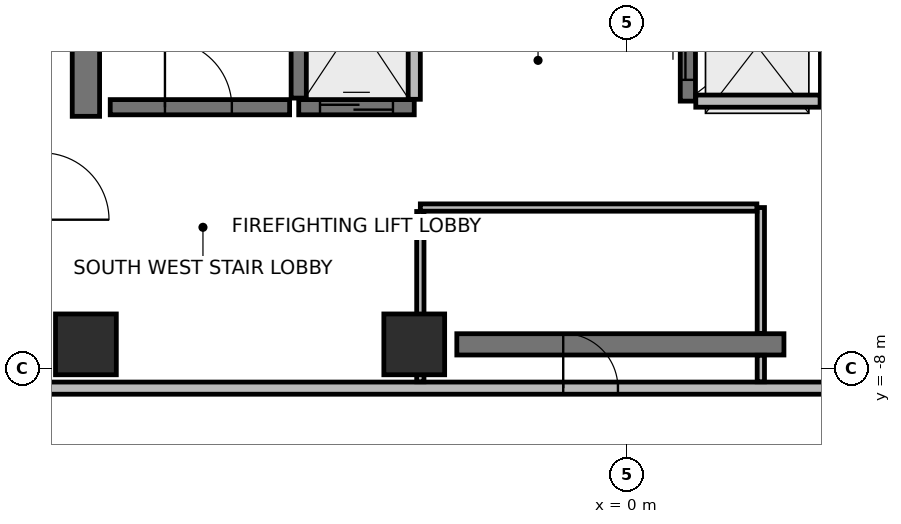
"""IFC4 building model, lengths in metres.
Left out: names, types, materials, properties, quantities, classifications, styles, units other than length and angle.
Written with IfcOpenShell. Run it as: python <this file> out.ifc"""

import sys

from ifc_helpers import new_model, si_unit, direction, frame, frame_2d, origin, origin_2d, place, context, subcontext, project, spatial, rectangle, extrude, element, fill, save


model = new_model("IFC4")
c1 = context("Model", 3, precision=1e-05, world=origin(), true_north=direction((0.0, 1.0)))
c2 = subcontext(c1, "Body", "Model", "MODEL_VIEW")
j1 = project(units=[si_unit("LENGTHUNIT", "METRE"), si_unit("PLANEANGLEUNIT", "RADIAN")], contexts=[c1])
p1 = place(None, origin())
s1 = spatial("IfcSite", under=j1, at=p1, CompositionType="ELEMENT")
p2 = place(p1, origin())
s2 = spatial("IfcBuilding", under=s1, at=p2, CompositionType="ELEMENT")
p3 = place(p2, frame((0.0, 0.0, 306.3)))
s3 = spatial("IfcBuildingStorey", under=s2, at=p3, CompositionType="ELEMENT", Elevation=306.3)
for number, where, z_axis, x_axis in (
    (1, (-8.9, -7.6, 0.0), (0.0, 0.0, 1.0), (1.0, 0.0, 0.0)),
    (2, (-3.5, -7.6, 0.0), (0.0, 0.0, 1.0), (1.0, 0.0, 0.0)),
):
    element("IfcColumn", number, at=place(p3, frame(where, z_axis=z_axis, x_axis=x_axis)), inside=s3, PredefinedType="COLUMN", context=c2, shape_type="SweptSolid", body=[
        extrude(rectangle(XDim=1.0, YDim=1.0, at=origin_2d()), origin(), (0.0, 0.0, 1.0), 4.55),
    ])
p4 = place(p3, frame((-24.537, -0.339, 0.0), z_axis=(0.0, 0.0, 1.0), x_axis=(0.669127961041, -0.743147207324, 0.0)))
e3 = element("IfcWall", 3, at=p4, inside=s3, PredefinedType="STANDARD", context=c2, shape_type="SweptSolid", body=[
    extrude(rectangle(XDim=42.14, YDim=0.3, at=frame_2d((21.07, 0.0))), origin(), (0.0, 0.0, 1.0), 3.805),
])
p5 = place(p4, frame((20.27, 0.0, 0.0)))
e4 = element("IfcOpeningElement", 4, at=p5, cuts=e3, PredefinedType="OPENING", context=c2, shape_type="SweptSolid", body=[
    extrude(rectangle(XDim=1.6, YDim=2.3, at=frame_2d((0.8, 1.15))), frame((0.0, 0.16, 0.0), z_axis=(0.0, -1.0, 0.0), x_axis=(1.0, 0.0, 0.0)), (0.0, 0.0, 1.0), 0.32),
])
p6 = place(p4, frame((9.535, 0.0, 0.85)))
e5 = element("IfcOpeningElement", 5, at=p6, cuts=e3, PredefinedType="OPENING", context=c2, shape_type="SweptSolid", body=[
    extrude(rectangle(XDim=2.0, YDim=2.4, at=frame_2d((1.0, 1.2))), frame((0.0, 0.16, 0.0), z_axis=(0.0, -1.0, 0.0), x_axis=(1.0, 0.0, 0.0)), (0.0, 0.0, 1.0), 0.32),
])
p7 = place(p4, frame((30.605, 0.0, 0.85)))
e6 = element("IfcOpeningElement", 6, at=p7, cuts=e3, PredefinedType="OPENING", context=c2, shape_type="SweptSolid", body=[
    extrude(rectangle(XDim=2.0, YDim=2.4, at=frame_2d((1.0, 1.2))), frame((0.0, 0.16, 0.0), z_axis=(0.0, -1.0, 0.0), x_axis=(1.0, 0.0, 0.0)), (0.0, 0.0, 1.0), 0.32),
])
p8 = place(p3, frame((-2.8, -7.6, 0.0), z_axis=(0.0, 0.0, 1.0), x_axis=(1.0, 0.0, 0.0)))
e7 = element("IfcWall", 7, at=p8, inside=s3, PredefinedType="SHEAR", context=c2, shape_type="SweptSolid", body=[
    extrude(rectangle(XDim=5.38, YDim=0.35, at=frame_2d((2.69, 0.0))), origin(), (0.0, 0.0, 1.0), 4.31),
])
p9 = place(p3, frame((-8.9, -3.85, 0.0), z_axis=(0.0, 0.0, 1.0), x_axis=(0.0, 1.0, 0.0)))
e8 = element("IfcWall", 8, at=p9, inside=s3, PredefinedType="SHEAR", context=c2, shape_type="SweptSolid", body=[
    extrude(rectangle(XDim=10.7, YDim=0.45, at=frame_2d((5.35, 0.0))), origin(), (0.0, 0.0, 1.0), 4.31),
])
p10 = place(p3, frame((-9.62, -8.32, 0.0), z_axis=(0.0, 0.0, 1.0), x_axis=(1.0, 0.0, 0.0)))
e9 = element("IfcWall", 9, at=p10, inside=s3, PredefinedType="PARTITIONING", context=c2, shape_type="SweptSolid", body=[
    extrude(rectangle(XDim=19.24, YDim=0.2, at=frame_2d((9.62, 0.0))), origin(), (0.0, 0.0, 1.0), 3.805),
])
p11 = place(p10, frame((8.57, 0.0, 0.0)))
e10 = element("IfcOpeningElement", 10, at=p11, cuts=e9, PredefinedType="OPENING", context=c2, shape_type="SweptSolid", body=[
    extrude(rectangle(XDim=0.9, YDim=2.1, at=frame_2d((0.45, 1.05))), frame((0.0, 0.11, 0.0), z_axis=(0.0, -1.0, 0.0), x_axis=(1.0, 0.0, 0.0)), (0.0, 0.0, 1.0), 0.22),
])
p12 = place(p10, frame((15.02, 0.0, 0.0)))
e11 = element("IfcOpeningElement", 11, at=p12, cuts=e9, PredefinedType="OPENING", context=c2, shape_type="SweptSolid", body=[
    extrude(rectangle(XDim=0.9, YDim=2.1, at=frame_2d((0.45, 1.05))), frame((0.0, 0.11, 0.0), z_axis=(0.0, -1.0, 0.0), x_axis=(1.0, 0.0, 0.0)), (0.0, 0.0, 1.0), 0.22),
])
p13 = place(p3, frame((-5.4, -3.55, 0.0), z_axis=(0.0, 0.0, 1.0), x_axis=(0.0, 1.0, 0.0)))
e12 = element("IfcWall", 12, at=p13, inside=s3, PredefinedType="SHEAR", context=c2, shape_type="SweptSolid", body=[
    extrude(rectangle(XDim=7.3, YDim=0.25, at=frame_2d((3.65, 0.0))), origin(), (0.0, 0.0, 1.0), 4.31),
])
p14 = place(p3, frame((-8.5, -3.7, 0.0), z_axis=(0.0, 0.0, 1.0), x_axis=(1.0, 0.0, 0.0)))
e13 = element("IfcWall", 13, at=p14, inside=s3, PredefinedType="SHEAR", context=c2, shape_type="SweptSolid", body=[
    extrude(rectangle(XDim=2.95, YDim=0.25, at=frame_2d((1.475, 0.0))), origin(), (0.0, 0.0, 1.0), 4.31),
])
p15 = place(p14, frame((0.9, 0.0, 0.0)))
e14 = element("IfcOpeningElement", 14, at=p15, cuts=e13, PredefinedType="OPENING", context=c2, shape_type="SweptSolid", body=[
    extrude(rectangle(XDim=1.1, YDim=2.15, at=frame_2d((0.55, 1.075))), frame((0.0, 0.135, 0.0), z_axis=(0.0, -1.0, 0.0), x_axis=(1.0, 0.0, 0.0)), (0.0, 0.0, 1.0), 0.27),
])
p16 = place(p3, frame((1.0, -3.6, 0.0), z_axis=(0.0, 0.0, 1.0), x_axis=(0.0, 1.0, 0.0)))
e15 = element("IfcWall", 15, at=p16, inside=s3, PredefinedType="SHEAR", context=c2, shape_type="SweptSolid", body=[
    extrude(rectangle(XDim=1.8, YDim=0.25, at=frame_2d((0.9, 0.0))), origin(), (0.0, 0.0, 1.0), 4.31),
])
p17 = place(p16, frame((0.35, 0.0, 0.0)))
e16 = element("IfcOpeningElement", 16, at=p17, cuts=e15, PredefinedType="OPENING", context=c2, shape_type="SweptSolid", body=[
    extrude(rectangle(XDim=1.1, YDim=2.2, at=frame_2d((0.55, 1.1))), frame((0.0, 0.135, 0.0), z_axis=(0.0, -1.0, 0.0), x_axis=(1.0, 0.0, 0.0)), (0.0, 0.0, 1.0), 0.27),
])
p18 = place(p3, frame((3.28, -3.6, 0.0), z_axis=(0.0, 0.0, 1.0), x_axis=(0.0, 1.0, 0.0)))
e17 = element("IfcWall", 17, at=p18, inside=s3, PredefinedType="PARTITIONING", context=c2, shape_type="SweptSolid", body=[
    extrude(rectangle(XDim=1.8, YDim=0.2, at=frame_2d((0.9, 0.0))), origin(), (0.0, 0.0, 1.0), 4.31),
])
p19 = place(p3, frame((1.13, -3.6, 0.0), z_axis=(0.0, 0.0, 1.0), x_axis=(1.0, 0.0, 0.0)))
e18 = element("IfcWall", 18, at=p19, inside=s3, PredefinedType="PARTITIONING", context=c2, shape_type="SweptSolid", body=[
    extrude(rectangle(XDim=2.045, YDim=0.2, at=frame_2d((1.022, 0.0))), origin(), (0.0, 0.0, 1.0), 4.31),
])
p20 = place(p3, frame((-5.4, -3.7, 0.0), z_axis=(0.0, 0.0, 1.0), x_axis=(1.0, 0.0, 0.0)))
e19 = element("IfcWall", 19, at=p20, inside=s3, PredefinedType="SHEAR", context=c2, shape_type="SweptSolid", body=[
    extrude(rectangle(XDim=1.9, YDim=0.25, at=frame_2d((0.95, 0.0))), origin(), (0.0, 0.0, 1.0), 4.31),
])
p21 = place(p20, frame((0.35, 0.0, 0.0)))
e20 = element("IfcOpeningElement", 20, at=p21, cuts=e19, PredefinedType="OPENING", context=c2, shape_type="SweptSolid", body=[
    extrude(rectangle(XDim=1.2, YDim=2.2, at=frame_2d((0.6, 1.1))), frame((0.0, 0.135, 0.0), z_axis=(0.0, -1.0, 0.0), x_axis=(1.0, 0.0, 0.0)), (0.0, 0.0, 1.0), 0.27),
])
p22 = place(p3, frame((-3.5, -3.57, 0.0), z_axis=(0.0, 0.0, 1.0), x_axis=(0.0, 1.0, 0.0)))
e21 = element("IfcWall", 21, at=p22, inside=s3, PredefinedType="PARTITIONING", context=c2, shape_type="SweptSolid", body=[
    extrude(rectangle(XDim=2.615, YDim=0.2, at=frame_2d((1.308, 0.0))), origin(), (0.0, 0.0, 1.0), 4.31),
])
p23 = place(p3, frame((2.2, -8.215, 0.0), z_axis=(0.0, 0.0, 1.0), x_axis=(0.0, 1.0, 0.0)))
e22 = element("IfcWall", 22, at=p23, inside=s3, PredefinedType="PARTITIONING", context=c2, shape_type="SweptSolid", body=[
    extrude(rectangle(XDim=0.435, YDim=0.12, at=frame_2d((0.218, 0.0))), origin(), (0.0, 0.0, 1.0), 3.605),
])
p24 = place(p3, frame((2.2, -7.42, 0.0), z_axis=(0.0, 0.0, 1.0), x_axis=(0.0, 1.0, 0.0)))
e23 = element("IfcWall", 23, at=p24, inside=s3, PredefinedType="PARTITIONING", context=c2, shape_type="SweptSolid", body=[
    extrude(rectangle(XDim=2.07, YDim=0.12, at=frame_2d((1.035, 0.0))), origin(), (0.0, 0.0, 1.0), 3.605),
])
p25 = place(p3, frame((2.135, -5.35, 0.0), z_axis=(0.0, 0.0, 1.0), x_axis=(-1.0, 0.0, 0.0)))
e24 = element("IfcWall", 24, at=p25, inside=s3, PredefinedType="PARTITIONING", context=c2, shape_type="SweptSolid", body=[
    extrude(rectangle(XDim=5.535, YDim=0.12, at=frame_2d((2.768, 0.0))), origin(), (0.0, 0.0, 1.0), 3.605),
])
p26 = place(p3, frame((-3.4, -5.415, 0.0), z_axis=(0.0, 0.0, 1.0), x_axis=(0.0, -1.0, 0.0)))
e25 = element("IfcWall", 25, at=p26, inside=s3, PredefinedType="PARTITIONING", context=c2, shape_type="SweptSolid", body=[
    extrude(rectangle(XDim=2.8, YDim=0.12, at=frame_2d((1.4, 0.0))), origin(), (0.0, 0.0, 1.0), 3.605),
])
p27 = place(p15, origin())
e26 = element("IfcDoor", 26, at=p27, inside=s3, OperationType="SINGLE_SWING_LEFT", PredefinedType="DOOR", context=c2, shape_type="SweptSolid", body=[
    extrude(rectangle(XDim=1.1, YDim=2.15, at=frame_2d((0.55, 1.075))), frame((0.0, 0.025, 0.0), z_axis=(0.0, -1.0, 0.0), x_axis=(1.0, 0.0, 0.0)), (0.0, 0.0, 1.0), 0.05),
])
fill(e14, e26)
p28 = place(p17, origin())
e27 = element("IfcDoor", 27, at=p28, inside=s3, OperationType="SLIDING_TO_LEFT", PredefinedType="DOOR", context=c2, shape_type="SweptSolid", body=[
    extrude(rectangle(XDim=1.1, YDim=2.2, at=frame_2d((0.55, 1.1))), frame((0.0, 0.025, 0.0), z_axis=(0.0, -1.0, 0.0), x_axis=(1.0, 0.0, 0.0)), (0.0, 0.0, 1.0), 0.05),
])
fill(e16, e27)
p29 = place(p21, origin())
e28 = element("IfcDoor", 28, at=p29, inside=s3, OperationType="SLIDING_TO_RIGHT", PredefinedType="DOOR", context=c2, shape_type="SweptSolid", body=[
    extrude(rectangle(XDim=1.2, YDim=2.2, at=frame_2d((0.6, 1.1))), frame((0.0, 0.025, 0.0), z_axis=(0.0, -1.0, 0.0), x_axis=(1.0, 0.0, 0.0)), (0.0, 0.0, 1.0), 0.05),
])
fill(e20, e28)
p30 = place(p11, origin())
e29 = element("IfcDoor", 29, at=p30, inside=s3, OperationType="SINGLE_SWING_LEFT", PredefinedType="DOOR", context=c2, shape_type="SweptSolid", body=[
    extrude(rectangle(XDim=0.9, YDim=2.1, at=frame_2d((0.45, 1.05))), frame((0.0, 0.025, 0.0), z_axis=(0.0, -1.0, 0.0), x_axis=(1.0, 0.0, 0.0)), (0.0, 0.0, 1.0), 0.05),
])
fill(e10, e29)
save(model, sys.argv[1])
